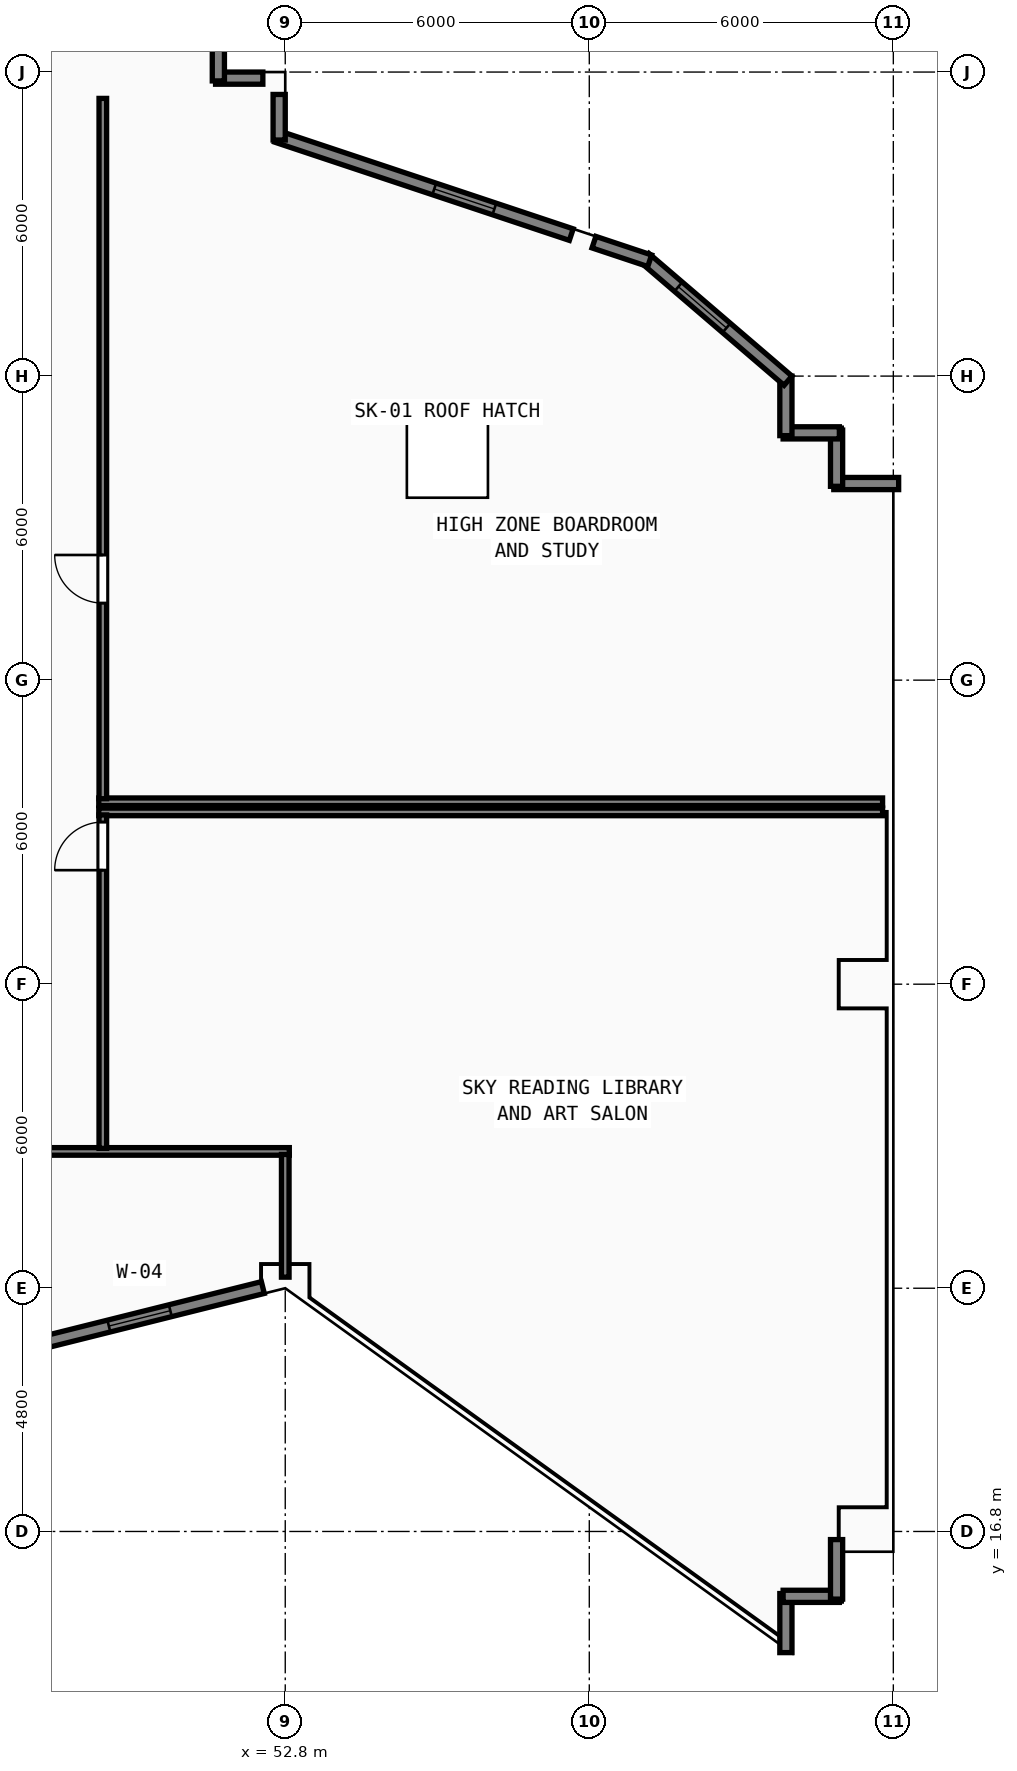
"""IFC4 building model, lengths in metres.
Left out: names, types, materials, properties, quantities, classifications, styles, units other than length and angle.
Written with IfcOpenShell. Run it as: python <this file> out.ifc"""

import sys

from ifc_helpers import new_model, si_unit, direction, frame, frame_2d, origin, origin_2d, place, context, subcontext, project, spatial, rectangle, hollow_rectangle, extrude, element, fill, save


model = new_model("IFC4")
c1 = context("Model", 3, precision=1e-05, world=origin(), true_north=direction((0.0, 1.0)))
c2 = subcontext(c1, "Body", "Model", "MODEL_VIEW")
j1 = project(units=[si_unit("LENGTHUNIT", "METRE"), si_unit("PLANEANGLEUNIT", "RADIAN")], contexts=[c1])
p1 = place(None, origin())
s1 = spatial("IfcSite", under=j1, at=p1, CompositionType="ELEMENT")
p2 = place(p1, origin())
s2 = spatial("IfcBuilding", under=s1, at=p2, CompositionType="ELEMENT")
p3 = place(p2, frame((0.0, 0.0, 164.6)))
s3 = spatial("IfcBuildingStorey", under=s2, at=p3, CompositionType="ELEMENT", Elevation=164.6)
for number, where, z_axis, x_axis in (
    (1, (52.8, 21.6, 0.0), (0.0, 0.0, 1.0), (1.0, 0.0, 0.0)),
    (2, (52.8, 33.6, 0.0), (0.0, 0.0, 1.0), (1.0, 0.0, 0.0)),
    (3, (52.8, 45.6, 0.0), (0.0, 0.0, 1.0), (1.0, 0.0, 0.0)),
    (4, (64.2, 16.8, 0.0), (0.0, 0.0, 1.0), (1.0, 0.0, 0.0)),
    (5, (64.2, 27.6, 0.0), (0.0, 0.0, 1.0), (1.0, 0.0, 0.0)),
):
    element("IfcColumn", number, at=place(p3, frame(where, z_axis=z_axis, x_axis=x_axis)), inside=s3, PredefinedType="COLUMN", context=c2, shape_type="SweptSolid", body=[
        extrude(hollow_rectangle(XDim=0.9, YDim=0.9, WallThickness=0.034, at=origin_2d()), origin(), (0.0, 0.0, 1.0), 4.4),
    ])
for number, where, z_axis, x_axis in (
    (6, (52.8, 27.6, 0.0), (0.0, 0.0, 1.0), (1.0, 0.0, 0.0)),
    (7, (52.8, 39.6, 0.0), (0.0, 0.0, 1.0), (1.0, 0.0, 0.0)),
    (8, (58.5, 19.2, 0.0), (0.0, 0.0, 1.0), (1.0, 0.0, 0.0)),
    (9, (58.5, 42.0, 0.0), (0.0, 0.0, 1.0), (1.0, 0.0, 0.0)),
):
    element("IfcColumn", number, at=place(p3, frame(where, z_axis=z_axis, x_axis=x_axis)), inside=s3, PredefinedType="COLUMN", context=c2, shape_type="SweptSolid", body=[
        extrude(hollow_rectangle(XDim=0.8, YDim=0.8, WallThickness=0.03, at=origin_2d()), origin(), (0.0, 0.0, 1.0), 4.4),
    ])
p4 = place(p3, frame((47.767, 20.465, 0.0), z_axis=(0.0, 0.0, 1.0), x_axis=(0.9701333955, 0.242572040715, 0.0)))
e10 = element("IfcWall", 10, at=p4, inside=s3, PredefinedType="SOLIDWALL", context=c2, shape_type="SweptSolid", body=[
    extrude(rectangle(XDim=4.732, YDim=0.24, at=frame_2d((2.366, 0.0))), origin(), (0.0, 0.0, 1.0), 3.815),
])
p5 = place(p4, frame((1.6, 0.0, 0.85)))
e11 = element("IfcOpeningElement", 11, at=p5, cuts=e10, PredefinedType="OPENING", context=c2, shape_type="SweptSolid", body=[
    extrude(rectangle(XDim=1.25, YDim=1.95, at=frame_2d((0.625, 0.975))), frame((0.0, 0.13, 0.0), z_axis=(0.0, -1.0, 0.0), x_axis=(1.0, 0.0, 0.0)), (0.0, 0.0, 1.0), 0.26),
])
p6 = place(p3, frame((62.68, 14.409, 0.0), z_axis=(0.0, 0.0, 1.0), x_axis=(0.0, 1.0, 0.0)))
e12 = element("IfcWall", 12, at=p6, inside=s3, PredefinedType="SOLIDWALL", context=c2, shape_type="SweptSolid", body=[
    extrude(rectangle(XDim=1.166, YDim=0.24, at=frame_2d((0.583, 0.0))), origin(), (0.0, 0.0, 1.0), 4.22),
])
p7 = place(p3, frame((62.625, 15.52, 0.0), z_axis=(0.0, 0.0, 1.0), x_axis=(1.0, 0.0, 0.0)))
e13 = element("IfcWall", 13, at=p7, inside=s3, PredefinedType="SOLIDWALL", context=c2, shape_type="SweptSolid", body=[
    extrude(rectangle(XDim=1.11, YDim=0.24, at=frame_2d((0.555, 0.0))), origin(), (0.0, 0.0, 1.0), 4.22),
])
p8 = place(p3, frame((63.68, 15.465, 0.0), z_axis=(0.0, 0.0, 1.0), x_axis=(0.0, 1.0, 0.0)))
e14 = element("IfcWall", 14, at=p8, inside=s3, PredefinedType="SOLIDWALL", context=c2, shape_type="SweptSolid", body=[
    extrude(rectangle(XDim=1.175, YDim=0.24, at=frame_2d((0.587, 0.0))), origin(), (0.0, 0.0, 1.0), 4.22),
])
p9 = place(p3, frame((64.905, 37.48, 0.0), z_axis=(0.0, 0.0, 1.0), x_axis=(-1.0, 0.0, 0.0)))
e15 = element("IfcWall", 15, at=p9, inside=s3, PredefinedType="SOLIDWALL", context=c2, shape_type="SweptSolid", body=[
    extrude(rectangle(XDim=1.28, YDim=0.24, at=frame_2d((0.64, 0.0))), origin(), (0.0, 0.0, 1.0), 4.22),
])
p10 = place(p3, frame((63.68, 37.425, 0.0), z_axis=(0.0, 0.0, 1.0), x_axis=(0.0, 1.0, 0.0)))
e16 = element("IfcWall", 16, at=p10, inside=s3, PredefinedType="SOLIDWALL", context=c2, shape_type="SweptSolid", body=[
    extrude(rectangle(XDim=1.11, YDim=0.24, at=frame_2d((0.555, 0.0))), origin(), (0.0, 0.0, 1.0), 4.22),
])
p11 = place(p3, frame((63.735, 38.48, 0.0), z_axis=(0.0, 0.0, 1.0), x_axis=(-1.0, 0.0, 0.0)))
e17 = element("IfcWall", 17, at=p11, inside=s3, PredefinedType="SOLIDWALL", context=c2, shape_type="SweptSolid", body=[
    extrude(rectangle(XDim=1.11, YDim=0.24, at=frame_2d((0.555, 0.0))), origin(), (0.0, 0.0, 1.0), 4.22),
])
p12 = place(p3, frame((62.68, 38.425, 0.0), z_axis=(0.0, 0.0, 1.0), x_axis=(0.0, 1.0, 0.0)))
e18 = element("IfcWall", 18, at=p12, inside=s3, PredefinedType="SOLIDWALL", context=c2, shape_type="SweptSolid", body=[
    extrude(rectangle(XDim=1.175, YDim=0.24, at=frame_2d((0.587, 0.0))), origin(), (0.0, 0.0, 1.0), 4.22),
])
p13 = place(p3, frame((62.722, 39.509, 0.0), z_axis=(0.0, 0.0, 1.0), x_axis=(-0.759247334792, 0.650802185469, 0.0)))
e19 = element("IfcWall", 19, at=p13, inside=s3, PredefinedType="SOLIDWALL", context=c2, shape_type="SweptSolid", body=[
    extrude(rectangle(XDim=3.719, YDim=0.24, at=frame_2d((1.86, 0.0))), origin(), (0.0, 0.0, 1.0), 4.22),
])
p14 = place(p13, frame((1.6, 0.0, 0.85)))
e20 = element("IfcOpeningElement", 20, at=p14, cuts=e19, PredefinedType="OPENING", context=c2, shape_type="SweptSolid", body=[
    extrude(rectangle(XDim=1.25, YDim=1.95, at=frame_2d((0.625, 0.975))), frame((0.0, 0.13, 0.0), z_axis=(0.0, -1.0, 0.0), x_axis=(1.0, 0.0, 0.0)), (0.0, 0.0, 1.0), 0.26),
])
p15 = place(p3, frame((59.992, 41.876, 0.0), z_axis=(0.0, 0.0, 1.0), x_axis=(-0.948662237962, 0.316290939272, 0.0)))
e21 = element("IfcWall", 21, at=p15, inside=s3, PredefinedType="SOLIDWALL", context=c2, shape_type="SweptSolid", body=[
    extrude(rectangle(XDim=1.159, YDim=0.24, at=frame_2d((0.58, 0.0))), origin(), (0.0, 0.0, 1.0), 4.22),
])
p16 = place(p3, frame((58.445, 42.392, 0.0), z_axis=(0.0, 0.0, 1.0), x_axis=(-0.948695242668, 0.316191929909, 0.0)))
e22 = element("IfcWall", 22, at=p16, inside=s3, PredefinedType="SOLIDWALL", context=c2, shape_type="SweptSolid", body=[
    extrude(rectangle(XDim=6.131, YDim=0.24, at=frame_2d((3.066, 0.0))), origin(), (0.0, 0.0, 1.0), 3.815),
])
p17 = place(p16, frame((1.6, 0.0, 0.85)))
e23 = element("IfcOpeningElement", 23, at=p17, cuts=e22, PredefinedType="OPENING", context=c2, shape_type="SweptSolid", body=[
    extrude(rectangle(XDim=1.25, YDim=1.95, at=frame_2d((0.625, 0.975))), frame((0.0, 0.13, 0.0), z_axis=(0.0, -1.0, 0.0), x_axis=(1.0, 0.0, 0.0)), (0.0, 0.0, 1.0), 0.26),
])
p18 = place(p3, frame((52.68, 44.259, 0.0), z_axis=(0.0, 0.0, 1.0), x_axis=(0.0, 1.0, 0.0)))
e24 = element("IfcWall", 24, at=p18, inside=s3, PredefinedType="SOLIDWALL", context=c2, shape_type="SweptSolid", body=[
    extrude(rectangle(XDim=0.899, YDim=0.24, at=frame_2d((0.45, 0.0))), origin(), (0.0, 0.0, 1.0), 3.815),
])
p19 = place(p3, frame((52.358, 45.48, 0.0), z_axis=(0.0, 0.0, 1.0), x_axis=(-1.0, 0.0, 0.0)))
e25 = element("IfcWall", 25, at=p19, inside=s3, PredefinedType="SOLIDWALL", context=c2, shape_type="SweptSolid", body=[
    extrude(rectangle(XDim=0.933, YDim=0.24, at=frame_2d((0.466, 0.0))), origin(), (0.0, 0.0, 1.0), 4.22),
])
p20 = place(p3, frame((51.48, 45.425, 0.0), z_axis=(0.0, 0.0, 1.0), x_axis=(0.0, 1.0, 0.0)))
e26 = element("IfcWall", 26, at=p20, inside=s3, PredefinedType="SOLIDWALL", context=c2, shape_type="SweptSolid", body=[
    extrude(rectangle(XDim=1.31, YDim=0.24, at=frame_2d((0.655, 0.0))), origin(), (0.0, 0.0, 1.0), 4.22),
])
p21 = place(p3, frame((23.92, 24.3, 0.0), z_axis=(0.0, 0.0, 1.0), x_axis=(1.0, 0.0, 0.0)))
e27 = element("IfcWall", 27, at=p21, inside=s3, PredefinedType="PARTITIONING", context=c2, shape_type="SweptSolid", body=[
    extrude(rectangle(XDim=28.96, YDim=0.15, at=frame_2d((14.48, 0.0))), origin(), (0.0, 0.0, 1.0), 4.22),
])
p22 = place(p21, frame((7.9, 0.0, 0.0), z_axis=(0.0, 0.0, 1.0), x_axis=(-1.0, 0.0, 0.0)))
e28 = element("IfcOpeningElement", 28, at=p22, cuts=e27, PredefinedType="OPENING", context=c2, shape_type="SweptSolid", body=[
    extrude(rectangle(XDim=1.4, YDim=2.18, at=frame_2d((0.7, 1.09))), frame((0.0, 0.085, 0.0), z_axis=(0.0, -1.0, 0.0), x_axis=(1.0, 0.0, 0.0)), (0.0, 0.0, 1.0), 0.17),
])
p23 = place(p3, frame((52.8, 21.819, 0.0), z_axis=(0.0, 0.0, 1.0), x_axis=(0.0, 1.0, 0.0)))
e29 = element("IfcWall", 29, at=p23, inside=s3, PredefinedType="PARTITIONING", context=c2, shape_type="SweptSolid", body=[
    extrude(rectangle(XDim=2.421, YDim=0.15, at=frame_2d((1.211, 0.0))), origin(), (0.0, 0.0, 1.0), 3.815),
])
p24 = place(p3, frame((49.12, 31.0, 0.0), z_axis=(0.0, 0.0, 1.0), x_axis=(1.0, 0.0, 0.0)))
e30 = element("IfcWall", 30, at=p24, inside=s3, PredefinedType="PARTITIONING", context=c2, shape_type="SweptSolid", body=[
    extrude(rectangle(XDim=15.468, YDim=0.15, at=frame_2d((7.734, 0.0))), origin(), (0.0, 0.0, 1.0), 4.22),
])
p25 = place(p3, frame((49.2, 24.36, 0.0), z_axis=(0.0, 0.0, 1.0), x_axis=(0.0, 1.0, 0.0)))
e31 = element("IfcWall", 31, at=p25, inside=s3, PredefinedType="PARTITIONING", context=c2, shape_type="SweptSolid", body=[
    extrude(rectangle(XDim=6.58, YDim=0.15, at=frame_2d((3.29, 0.0))), origin(), (0.0, 0.0, 1.0), 4.22),
])
p26 = place(p25, frame((5.49, 0.0, 0.0)))
e32 = element("IfcOpeningElement", 32, at=p26, cuts=e31, PredefinedType="OPENING", context=c2, shape_type="SweptSolid", body=[
    extrude(rectangle(XDim=0.95, YDim=2.12, at=frame_2d((0.475, 1.06))), frame((0.0, 0.085, 0.0), z_axis=(0.0, -1.0, 0.0), x_axis=(1.0, 0.0, 0.0)), (0.0, 0.0, 1.0), 0.17),
])
p27 = place(p3, frame((49.12, 31.2, 0.0), z_axis=(0.0, 0.0, 1.0), x_axis=(1.0, 0.0, 0.0)))
e33 = element("IfcWall", 33, at=p27, inside=s3, PredefinedType="PARTITIONING", context=c2, shape_type="SweptSolid", body=[
    extrude(rectangle(XDim=15.468, YDim=0.15, at=frame_2d((7.734, 0.0))), origin(), (0.0, 0.0, 1.0), 4.22),
])
p28 = place(p3, frame((49.2, 31.26, 0.0), z_axis=(0.0, 0.0, 1.0), x_axis=(0.0, 1.0, 0.0)))
e34 = element("IfcWall", 34, at=p28, inside=s3, PredefinedType="PARTITIONING", context=c2, shape_type="SweptSolid", body=[
    extrude(rectangle(XDim=13.82, YDim=0.15, at=frame_2d((6.91, 0.0))), origin(), (0.0, 0.0, 1.0), 4.22),
])
p29 = place(p28, frame((3.86, 0.0, 0.0)))
e35 = element("IfcOpeningElement", 35, at=p29, cuts=e34, PredefinedType="OPENING", context=c2, shape_type="SweptSolid", body=[
    extrude(rectangle(XDim=0.95, YDim=2.12, at=frame_2d((0.475, 1.06))), frame((0.0, 0.085, 0.0), z_axis=(0.0, -1.0, 0.0), x_axis=(1.0, 0.0, 0.0)), (0.0, 0.0, 1.0), 0.17),
])
p30 = place(p5, origin())
e36 = element("IfcWindow", 36, at=p30, inside=s3, PartitioningType="SINGLE_PANEL", PredefinedType="WINDOW", context=c2, shape_type="SweptSolid", body=[
    extrude(rectangle(XDim=1.25, YDim=1.95, at=frame_2d((0.625, 0.975))), frame((0.0, 0.03, 0.0), z_axis=(0.0, -1.0, 0.0), x_axis=(1.0, 0.0, 0.0)), (0.0, 0.0, 1.0), 0.06),
])
fill(e11, e36)
p31 = place(p14, origin())
e37 = element("IfcWindow", 37, at=p31, inside=s3, PartitioningType="SINGLE_PANEL", PredefinedType="WINDOW", context=c2, shape_type="SweptSolid", body=[
    extrude(rectangle(XDim=1.25, YDim=1.95, at=frame_2d((0.625, 0.975))), frame((0.0, 0.03, 0.0), z_axis=(0.0, -1.0, 0.0), x_axis=(1.0, 0.0, 0.0)), (0.0, 0.0, 1.0), 0.06),
])
fill(e20, e37)
p32 = place(p17, origin())
e38 = element("IfcWindow", 38, at=p32, inside=s3, PartitioningType="SINGLE_PANEL", PredefinedType="WINDOW", context=c2, shape_type="SweptSolid", body=[
    extrude(rectangle(XDim=1.25, YDim=1.95, at=frame_2d((0.625, 0.975))), frame((0.0, 0.03, 0.0), z_axis=(0.0, -1.0, 0.0), x_axis=(1.0, 0.0, 0.0)), (0.0, 0.0, 1.0), 0.06),
])
fill(e23, e38)
p33 = place(p3, frame((0.0, 0.0, -0.25)))
p34 = place(p33, frame((56.0, 38.0, 0.0)))
p35 = place(p34, frame((0.0, 0.0, 0.2)))
e39 = element("IfcWindow", 39, at=p35, inside=s3, PartitioningType="SINGLE_PANEL", PredefinedType="SKYLIGHT", context=c2, shape_type="SweptSolid", body=[
    extrude(rectangle(XDim=1.6, YDim=1.6, at=origin_2d()), origin(), (0.0, 0.0, 1.0), 0.05),
])
p36 = place(p26, origin())
e40 = element("IfcDoor", 40, at=p36, inside=s3, OperationType="SINGLE_SWING_LEFT", PredefinedType="DOOR", context=c2, shape_type="SweptSolid", body=[
    extrude(rectangle(XDim=0.95, YDim=2.12, at=frame_2d((0.475, 1.06))), frame((0.0, 0.025, 0.0), z_axis=(0.0, -1.0, 0.0), x_axis=(1.0, 0.0, 0.0)), (0.0, 0.0, 1.0), 0.05),
])
fill(e32, e40)
p37 = place(p29, origin())
e41 = element("IfcDoor", 41, at=p37, inside=s3, OperationType="SINGLE_SWING_RIGHT", PredefinedType="DOOR", context=c2, shape_type="SweptSolid", body=[
    extrude(rectangle(XDim=0.95, YDim=2.12, at=frame_2d((0.475, 1.06))), frame((0.0, 0.025, 0.0), z_axis=(0.0, -1.0, 0.0), x_axis=(1.0, 0.0, 0.0)), (0.0, 0.0, 1.0), 0.05),
])
fill(e35, e41)
save(model, sys.argv[1])
